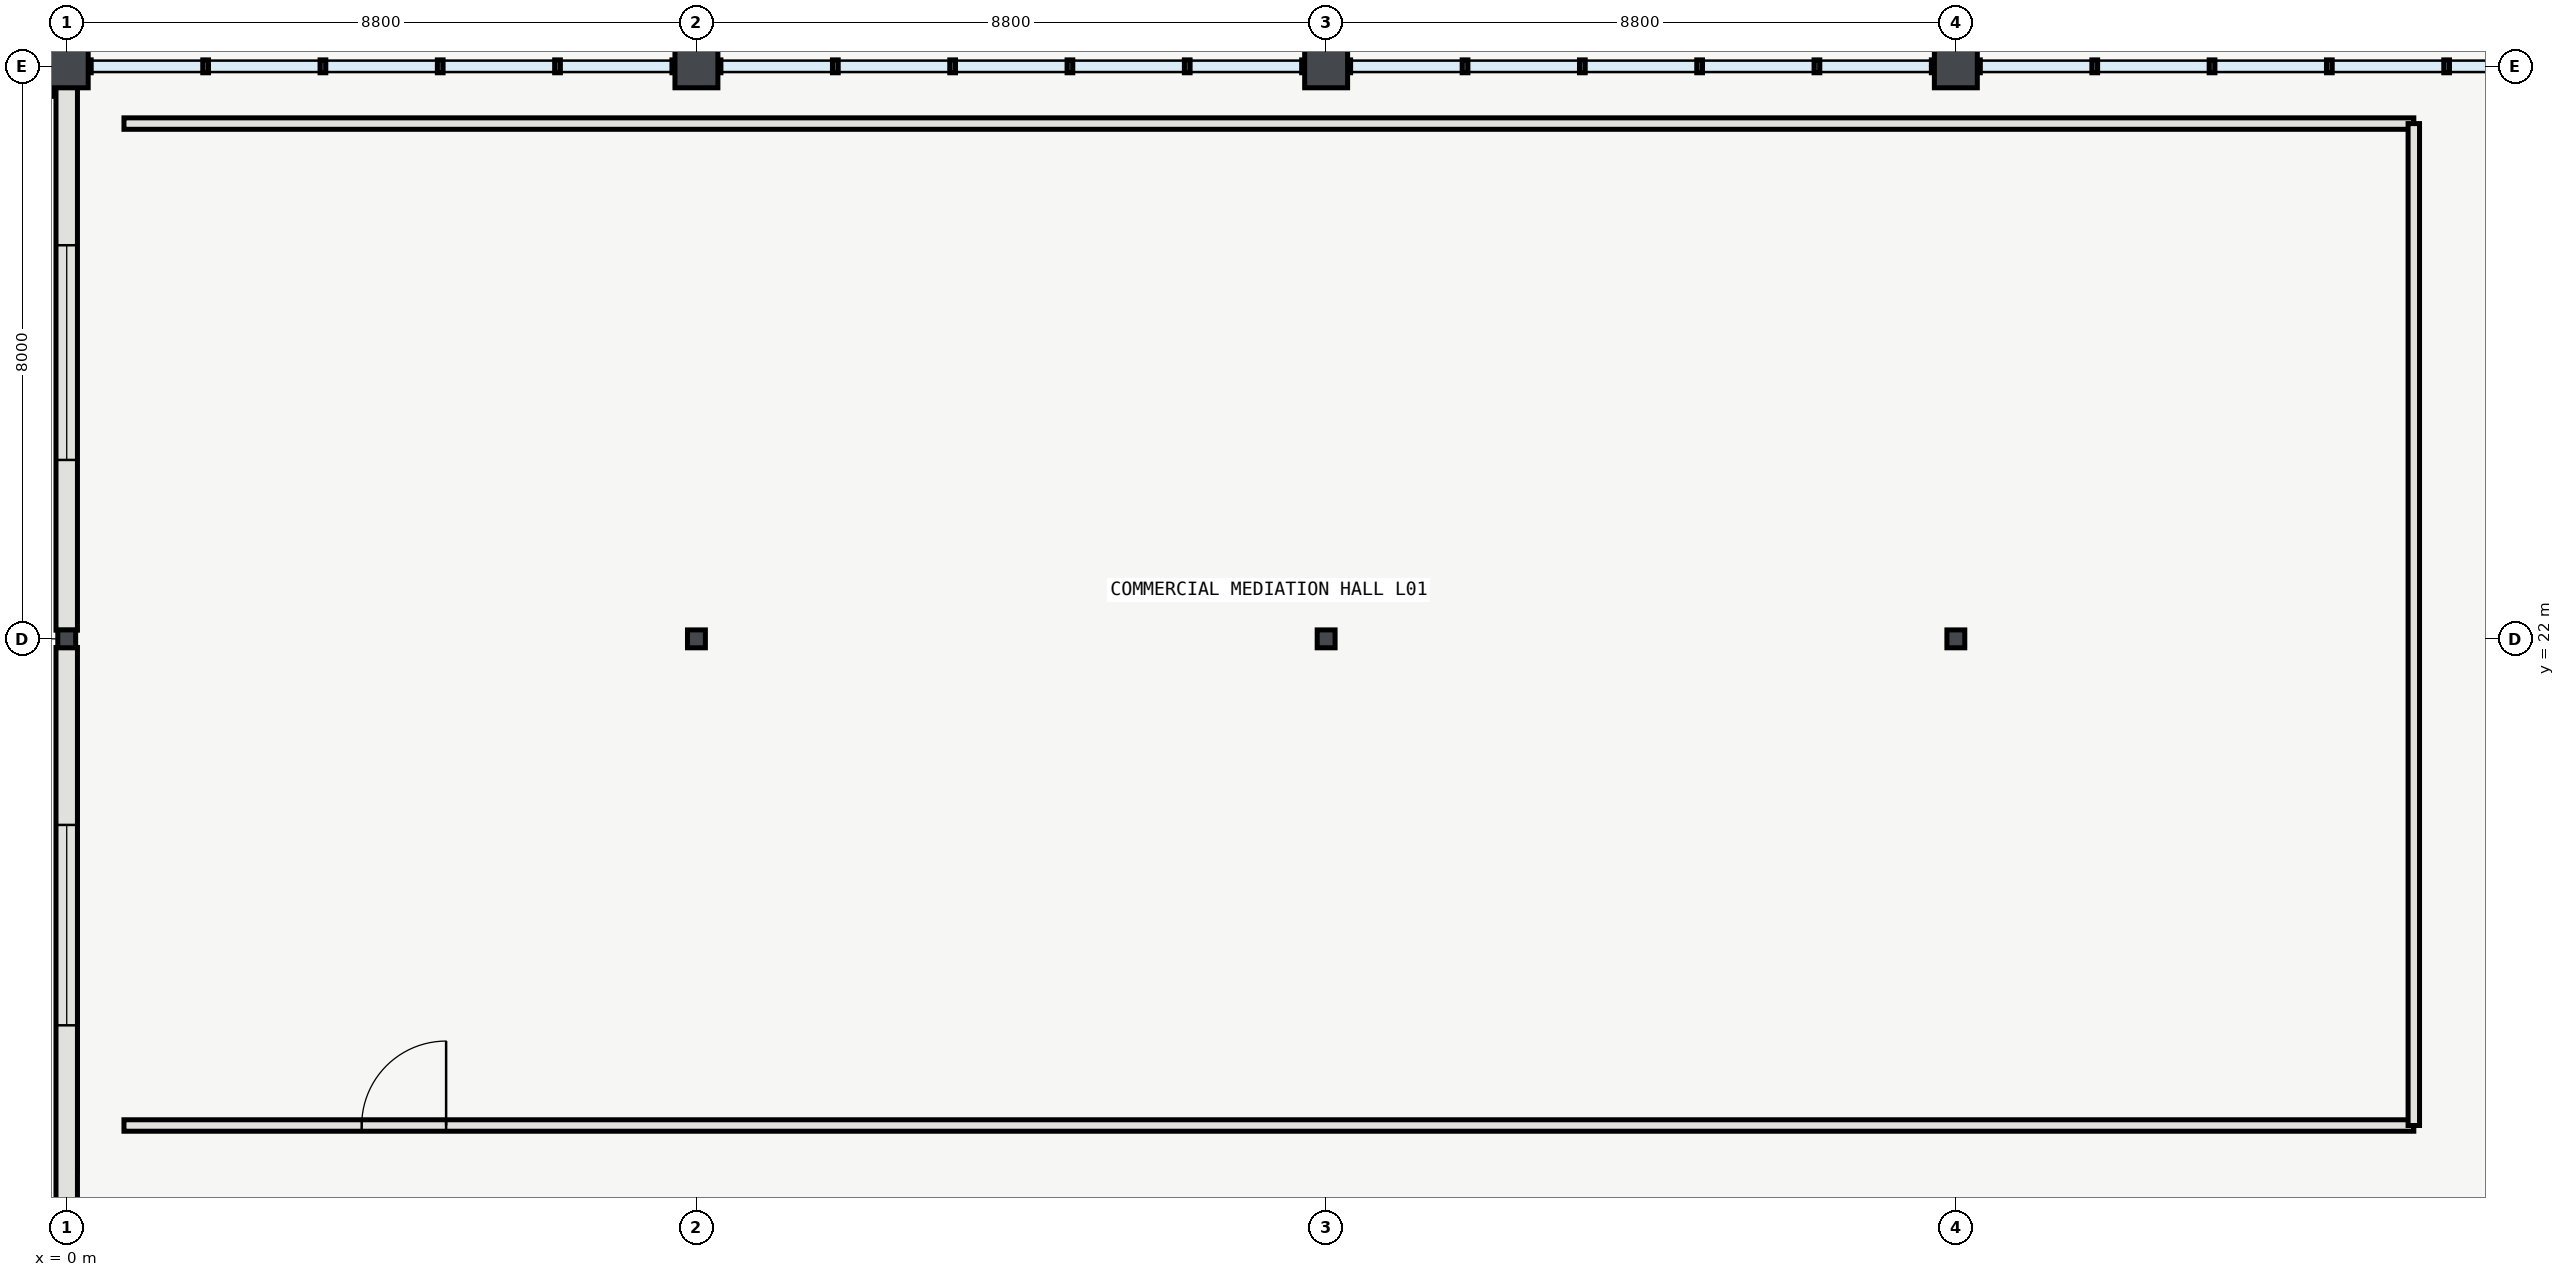
"""IFC4 building model, lengths in metres.
Left out: names, types, materials, properties, quantities, classifications, styles, units other than length and angle.
Written with IfcOpenShell. Run it as: python <this file> out.ifc"""

import sys

from ifc_helpers import new_model, si_unit, direction, frame, frame_2d, origin, origin_2d, place, context, subcontext, project, spatial, rectangle, hollow_rectangle, i_section, extrude, element, fill, save


model = new_model("IFC4")
c1 = context("Model", 3, precision=1e-05, world=origin(), true_north=direction((0.0, 1.0)))
c2 = subcontext(c1, "Body", "Model", "MODEL_VIEW")
j1 = project(units=[si_unit("LENGTHUNIT", "METRE"), si_unit("PLANEANGLEUNIT", "RADIAN")], contexts=[c1])
p1 = place(None, origin())
s1 = spatial("IfcSite", under=j1, at=p1, CompositionType="ELEMENT")
p2 = place(p1, origin())
s2 = spatial("IfcBuilding", under=s1, at=p2, CompositionType="ELEMENT")
p3 = place(p2, frame((0.0, 0.0, 5.4)))
s3 = spatial("IfcBuildingStorey", under=s2, at=p3, CompositionType="ELEMENT", Elevation=5.4)
p4 = place(p3, frame((0.0, 22.0, 0.0), z_axis=(0.0, 0.0, 1.0), x_axis=(1.0, 0.0, 0.0)))
e1 = element("IfcColumn", 1, at=p4, inside=s3, PredefinedType="COLUMN", context=c2, shape_type="SweptSolid", body=[
    extrude(i_section(OverallWidth=0.25, OverallDepth=0.25, WebThickness=0.009, FlangeThickness=0.014, FilletRadius=0.016, at=origin_2d()), origin(), (0.0, 0.0, 1.0), 5.4),
])
p5 = place(p3, frame((0.0, 30.0, 0.0), z_axis=(0.0, 0.0, 1.0), x_axis=(1.0, 0.0, 0.0)))
e2 = element("IfcColumn", 2, at=p5, inside=s3, PredefinedType="COLUMN", context=c2, shape_type="SweptSolid", body=[
    extrude(hollow_rectangle(XDim=0.6, YDim=0.6, WallThickness=0.024, InnerFilletRadius=0.024, OuterFilletRadius=0.048, at=origin_2d()), origin(), (0.0, 0.0, 1.0), 5.4),
])
p6 = place(p3, frame((8.8, 22.0, 0.0), z_axis=(0.0, 0.0, 1.0), x_axis=(1.0, 0.0, 0.0)))
e3 = element("IfcColumn", 3, at=p6, inside=s3, PredefinedType="COLUMN", context=c2, shape_type="SweptSolid", body=[
    extrude(i_section(OverallWidth=0.25, OverallDepth=0.25, WebThickness=0.009, FlangeThickness=0.014, FilletRadius=0.016, at=origin_2d()), origin(), (0.0, 0.0, 1.0), 5.4),
])
p7 = place(p3, frame((8.8, 30.0, 0.0), z_axis=(0.0, 0.0, 1.0), x_axis=(1.0, 0.0, 0.0)))
e4 = element("IfcColumn", 4, at=p7, inside=s3, PredefinedType="COLUMN", context=c2, shape_type="SweptSolid", body=[
    extrude(hollow_rectangle(XDim=0.6, YDim=0.6, WallThickness=0.024, InnerFilletRadius=0.024, OuterFilletRadius=0.048, at=origin_2d()), origin(), (0.0, 0.0, 1.0), 5.4),
])
p8 = place(p3, frame((17.6, 22.0, 0.0), z_axis=(0.0, 0.0, 1.0), x_axis=(1.0, 0.0, 0.0)))
e5 = element("IfcColumn", 5, at=p8, inside=s3, PredefinedType="COLUMN", context=c2, shape_type="SweptSolid", body=[
    extrude(i_section(OverallWidth=0.25, OverallDepth=0.25, WebThickness=0.009, FlangeThickness=0.014, FilletRadius=0.016, at=origin_2d()), origin(), (0.0, 0.0, 1.0), 5.4),
])
p9 = place(p3, frame((17.6, 30.0, 0.0), z_axis=(0.0, 0.0, 1.0), x_axis=(1.0, 0.0, 0.0)))
e6 = element("IfcColumn", 6, at=p9, inside=s3, PredefinedType="COLUMN", context=c2, shape_type="SweptSolid", body=[
    extrude(hollow_rectangle(XDim=0.6, YDim=0.6, WallThickness=0.024, InnerFilletRadius=0.024, OuterFilletRadius=0.048, at=origin_2d()), origin(), (0.0, 0.0, 1.0), 5.4),
])
p10 = place(p3, frame((26.4, 22.0, 0.0), z_axis=(0.0, 0.0, 1.0), x_axis=(1.0, 0.0, 0.0)))
e7 = element("IfcColumn", 7, at=p10, inside=s3, PredefinedType="COLUMN", context=c2, shape_type="SweptSolid", body=[
    extrude(i_section(OverallWidth=0.25, OverallDepth=0.25, WebThickness=0.009, FlangeThickness=0.014, FilletRadius=0.016, at=origin_2d()), origin(), (0.0, 0.0, 1.0), 5.4),
])
p11 = place(p3, frame((26.4, 30.0, 0.0), z_axis=(0.0, 0.0, 1.0), x_axis=(1.0, 0.0, 0.0)))
e8 = element("IfcColumn", 8, at=p11, inside=s3, PredefinedType="COLUMN", context=c2, shape_type="SweptSolid", body=[
    extrude(hollow_rectangle(XDim=0.6, YDim=0.6, WallThickness=0.024, InnerFilletRadius=0.024, OuterFilletRadius=0.048, at=origin_2d()), origin(), (0.0, 0.0, 1.0), 5.4),
])
p12 = place(p3, frame((0.0, 21.879, 0.0), z_axis=(0.0, 0.0, 1.0), x_axis=(0.0, -1.0, 0.0)))
e9 = element("IfcWall", 9, at=p12, inside=s3, PredefinedType="SOLIDWALL", context=c2, shape_type="SweptSolid", body=[
    extrude(rectangle(XDim=7.758, YDim=0.3, at=frame_2d((3.879, 0.0))), origin(), (0.0, 0.0, 1.0), 4.523),
])
p13 = place(p12, frame((2.479, 0.0, 0.95)))
e10 = element("IfcOpeningElement", 10, at=p13, cuts=e9, PredefinedType="OPENING", context=c2, shape_type="SweptSolid", body=[
    extrude(rectangle(XDim=2.8, YDim=2.1, at=frame_2d((1.4, 1.05))), frame((0.0, 0.16, 0.0), z_axis=(0.0, -1.0, 0.0), x_axis=(1.0, 0.0, 0.0)), (0.0, 0.0, 1.0), 0.32),
])
p14 = place(p3, frame((0.0, 29.704, 0.0), z_axis=(0.0, 0.0, 1.0), x_axis=(0.0, -1.0, 0.0)))
e11 = element("IfcWall", 11, at=p14, inside=s3, PredefinedType="SOLIDWALL", context=c2, shape_type="SweptSolid", body=[
    extrude(rectangle(XDim=7.583, YDim=0.3, at=frame_2d((3.792, 0.0))), origin(), (0.0, 0.0, 1.0), 4.523),
])
p15 = place(p14, frame((2.204, 0.0, 0.95)))
e12 = element("IfcOpeningElement", 12, at=p15, cuts=e11, PredefinedType="OPENING", context=c2, shape_type="SweptSolid", body=[
    extrude(rectangle(XDim=3.0, YDim=2.1, at=frame_2d((1.5, 1.05))), frame((0.0, 0.16, 0.0), z_axis=(0.0, -1.0, 0.0), x_axis=(1.0, 0.0, 0.0)), (0.0, 0.0, 1.0), 0.32),
])
p16 = place(p3, frame((0.8, 15.2, 0.0), z_axis=(0.0, 0.0, 1.0), x_axis=(1.0, 0.0, 0.0)))
e13 = element("IfcWall", 13, at=p16, inside=s3, PredefinedType="PARTITIONING", context=c2, shape_type="SweptSolid", body=[
    extrude(rectangle(XDim=32.0, YDim=0.16, at=frame_2d((16.0, 0.0))), origin(), (0.0, 0.0, 1.0), 5.12),
])
p17 = place(p16, frame((3.322, 0.0, 0.0)))
e14 = element("IfcOpeningElement", 14, at=p17, cuts=e13, PredefinedType="OPENING", context=c2, shape_type="SweptSolid", body=[
    extrude(rectangle(XDim=1.18, YDim=2.2, at=frame_2d((0.59, 1.1))), frame((0.0, 0.09, 0.0), z_axis=(0.0, -1.0, 0.0), x_axis=(1.0, 0.0, 0.0)), (0.0, 0.0, 1.0), 0.18),
])
p18 = place(p3, frame((32.8, 29.2, 0.0), z_axis=(0.0, 0.0, 1.0), x_axis=(-1.0, 0.0, 0.0)))
e15 = element("IfcWall", 15, at=p18, inside=s3, PredefinedType="PARTITIONING", context=c2, shape_type="SweptSolid", body=[
    extrude(rectangle(XDim=32.0, YDim=0.16, at=frame_2d((16.0, 0.0))), origin(), (0.0, 0.0, 1.0), 5.12),
])
p19 = place(p3, frame((32.8, 15.2, 0.0), z_axis=(0.0, 0.0, 1.0), x_axis=(0.0, 1.0, 0.0)))
e16 = element("IfcWall", 16, at=p19, inside=s3, PredefinedType="PARTITIONING", context=c2, shape_type="SweptSolid", body=[
    extrude(rectangle(XDim=14.0, YDim=0.16, at=frame_2d((7.0, 0.0))), origin(), (0.0, 0.0, 1.0), 5.12),
])
p20 = place(p13, origin())
e17 = element("IfcWindow", 17, at=p20, inside=s3, PartitioningType="SINGLE_PANEL", PredefinedType="WINDOW", context=c2, shape_type="SweptSolid", body=[
    extrude(rectangle(XDim=2.8, YDim=2.1, at=frame_2d((1.4, 1.05))), frame((0.0, 0.03, 0.0), z_axis=(0.0, -1.0, 0.0), x_axis=(1.0, 0.0, 0.0)), (0.0, 0.0, 1.0), 0.06),
])
fill(e10, e17)
p21 = place(p15, origin())
e18 = element("IfcWindow", 18, at=p21, inside=s3, PartitioningType="SINGLE_PANEL", PredefinedType="WINDOW", context=c2, shape_type="SweptSolid", body=[
    extrude(rectangle(XDim=3.0, YDim=2.1, at=frame_2d((1.5, 1.05))), frame((0.0, 0.03, 0.0), z_axis=(0.0, -1.0, 0.0), x_axis=(1.0, 0.0, 0.0)), (0.0, 0.0, 1.0), 0.06),
])
fill(e12, e18)
p22 = place(p17, origin())
e19 = element("IfcDoor", 19, at=p22, inside=s3, OperationType="SINGLE_SWING_RIGHT", PredefinedType="DOOR", context=c2, shape_type="SweptSolid", body=[
    extrude(rectangle(XDim=1.18, YDim=2.2, at=frame_2d((0.59, 1.1))), frame((0.0, 0.025, 0.0), z_axis=(0.0, -1.0, 0.0), x_axis=(1.0, 0.0, 0.0)), (0.0, 0.0, 1.0), 0.05),
])
fill(e14, e19)
save(model, sys.argv[1])
